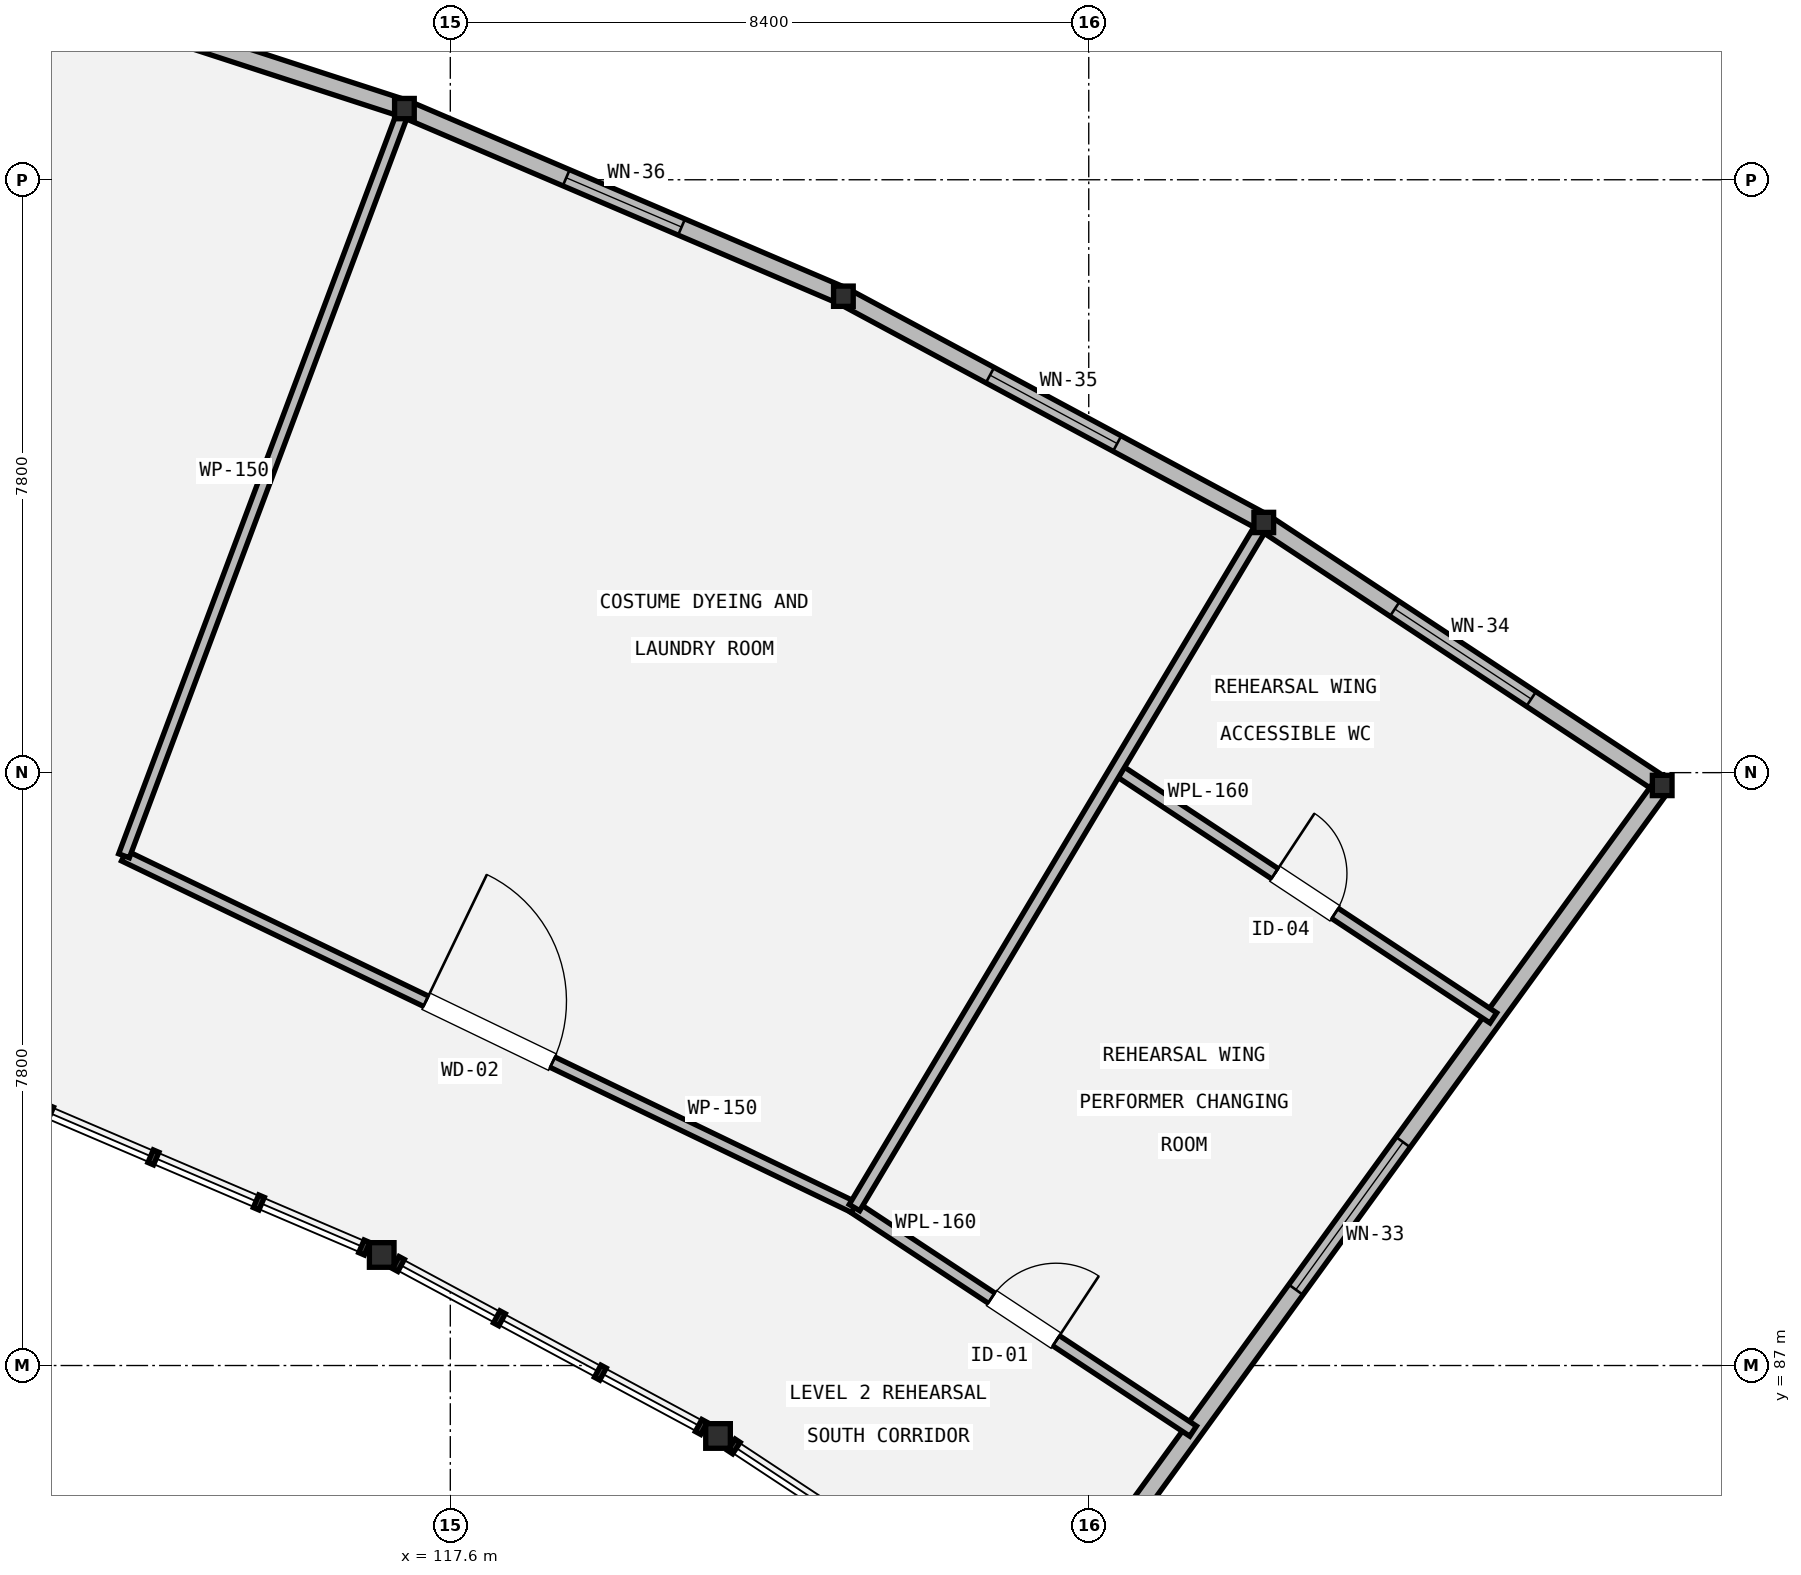
"""IFC4 building model, lengths in metres.
Left out: names, types, materials, properties, quantities, classifications, styles, units other than length and angle.
Written with IfcOpenShell. Run it as: python <this file> out.ifc"""

import sys

from ifc_helpers import new_model, si_unit, direction, frame, frame_2d, origin, origin_2d, place, context, subcontext, project, spatial, rectangle, hollow_circle, i_section, extrude, element, fill, save


model = new_model("IFC4")
c1 = context("Model", 3, precision=1e-05, world=origin(), true_north=direction((0.0, 1.0)))
c2 = subcontext(c1, "Body", "Model", "MODEL_VIEW")
j1 = project(units=[si_unit("LENGTHUNIT", "METRE"), si_unit("PLANEANGLEUNIT", "RADIAN")], contexts=[c1])
p1 = place(None, origin())
s1 = spatial("IfcSite", under=j1, at=p1, CompositionType="ELEMENT")
p2 = place(p1, origin())
s2 = spatial("IfcBuilding", under=s1, at=p2, CompositionType="ELEMENT")
p3 = place(p2, frame((0.0, 0.0, 10.2)))
s3 = spatial("IfcBuildingStorey", under=s2, at=p3, CompositionType="ELEMENT", Elevation=10.2)
p4 = place(p3, frame((116.996, 103.536, 0.0), z_axis=(0.0, 0.0, 1.0), x_axis=(1.0, 0.0, 0.0)))
e1 = element("IfcColumn", 1, at=p4, inside=s3, PredefinedType="COLUMN", context=c2, shape_type="SweptSolid", body=[
    extrude(i_section(OverallWidth=0.259, OverallDepth=0.267, WebThickness=0.013, FlangeThickness=0.021, FilletRadius=0.013, at=origin_2d()), origin(), (0.0, 0.0, 1.0), 4.8),
])
p5 = place(p3, frame((116.698, 88.454, 0.0), z_axis=(0.0, 0.0, 1.0), x_axis=(1.0, 0.0, 0.0)))
e2 = element("IfcColumn", 2, at=p5, inside=s3, PredefinedType="COLUMN", context=c2, shape_type="SweptSolid", body=[
    extrude(hollow_circle(Radius=0.162, WallThickness=0.012, at=origin_2d()), origin(), (0.0, 0.0, 1.0), 4.8),
])
p6 = place(p3, frame((122.772, 101.068, 0.0), z_axis=(0.0, 0.0, 1.0), x_axis=(1.0, 0.0, 0.0)))
e3 = element("IfcColumn", 3, at=p6, inside=s3, PredefinedType="COLUMN", context=c2, shape_type="SweptSolid", body=[
    extrude(i_section(OverallWidth=0.259, OverallDepth=0.267, WebThickness=0.013, FlangeThickness=0.021, FilletRadius=0.013, at=origin_2d()), origin(), (0.0, 0.0, 1.0), 4.8),
])
p7 = place(p3, frame((121.122, 86.073, 0.0), z_axis=(0.0, 0.0, 1.0), x_axis=(1.0, 0.0, 0.0)))
e4 = element("IfcColumn", 4, at=p7, inside=s3, PredefinedType="COLUMN", context=c2, shape_type="SweptSolid", body=[
    extrude(hollow_circle(Radius=0.162, WallThickness=0.012, at=origin_2d()), origin(), (0.0, 0.0, 1.0), 4.8),
])
for number, where, z_axis, x_axis in (
    (5, (128.303, 98.091, 0.0), (0.0, 0.0, 1.0), (1.0, 0.0, 0.0)),
    (6, (133.545, 94.631, 0.0), (0.0, 0.0, 1.0), (1.0, 0.0, 0.0)),
):
    element("IfcColumn", number, at=place(p3, frame(where, z_axis=z_axis, x_axis=x_axis)), inside=s3, PredefinedType="COLUMN", context=c2, shape_type="SweptSolid", body=[
        extrude(i_section(OverallWidth=0.259, OverallDepth=0.267, WebThickness=0.013, FlangeThickness=0.021, FilletRadius=0.013, at=origin_2d()), origin(), (0.0, 0.0, 1.0), 4.8),
    ])
p8 = place(p3, frame((111.023, 105.477, 0.0), z_axis=(0.0, 0.0, 1.0), x_axis=(0.951054348109, -0.309023667285, 0.0)))
e7 = element("IfcWall", 7, at=p8, inside=s3, PredefinedType="STANDARD", context=c2, shape_type="SweptSolid", body=[
    extrude(rectangle(XDim=6.281, YDim=0.23, at=frame_2d((3.14, 0.0))), origin(), (0.0, 0.0, 1.0), 4.059),
])
p9 = place(p3, frame((116.996, 103.536, 0.0), z_axis=(0.0, 0.0, 1.0), x_axis=(0.919540617607, -0.392994977793, 0.0)))
e8 = element("IfcWall", 8, at=p9, inside=s3, PredefinedType="STANDARD", context=c2, shape_type="SweptSolid", body=[
    extrude(rectangle(XDim=6.281, YDim=0.23, at=frame_2d((3.141, 0.0))), origin(), (0.0, 0.0, 1.0), 4.059),
])
p10 = place(p9, frame((2.316, 0.0, 0.9)))
e9 = element("IfcOpeningElement", 9, at=p10, cuts=e8, PredefinedType="OPENING", context=c2, shape_type="SweptSolid", body=[
    extrude(rectangle(XDim=1.65, YDim=1.65, at=frame_2d((0.825, 0.825))), frame((0.0, 0.125, 0.0), z_axis=(0.0, -1.0, 0.0), x_axis=(1.0, 0.0, 0.0)), (0.0, 0.0, 1.0), 0.25),
])
p11 = place(p3, frame((122.772, 101.068, 0.0), z_axis=(0.0, 0.0, 1.0), x_axis=(0.880582156138, -0.473893517883, 0.0)))
e10 = element("IfcWall", 10, at=p11, inside=s3, PredefinedType="STANDARD", context=c2, shape_type="SweptSolid", body=[
    extrude(rectangle(XDim=6.281, YDim=0.23, at=frame_2d((3.141, 0.0))), origin(), (0.0, 0.0, 1.0), 4.059),
])
p12 = place(p11, frame((2.19, 0.0, 0.9)))
e11 = element("IfcOpeningElement", 11, at=p12, cuts=e10, PredefinedType="OPENING", context=c2, shape_type="SweptSolid", body=[
    extrude(rectangle(XDim=1.9, YDim=1.65, at=frame_2d((0.95, 0.825))), frame((0.0, 0.125, 0.0), z_axis=(0.0, -1.0, 0.0), x_axis=(1.0, 0.0, 0.0)), (0.0, 0.0, 1.0), 0.25),
])
p13 = place(p3, frame((128.303, 98.091, 0.0), z_axis=(0.0, 0.0, 1.0), x_axis=(0.834571163011, -0.550900148729, 0.0)))
e12 = element("IfcWall", 12, at=p13, inside=s3, PredefinedType="STANDARD", context=c2, shape_type="SweptSolid", body=[
    extrude(rectangle(XDim=6.281, YDim=0.23, at=frame_2d((3.141, 0.0))), origin(), (0.0, 0.0, 1.0), 4.059),
])
p14 = place(p13, frame((2.066, 0.0, 0.9)))
e13 = element("IfcOpeningElement", 13, at=p14, cuts=e12, PredefinedType="OPENING", context=c2, shape_type="SweptSolid", body=[
    extrude(rectangle(XDim=2.15, YDim=1.65, at=frame_2d((1.075, 0.825))), frame((0.0, 0.125, 0.0), z_axis=(0.0, -1.0, 0.0), x_axis=(1.0, 0.0, 0.0)), (0.0, 0.0, 1.0), 0.25),
])
p15 = place(p3, frame((133.545, 94.631, 0.0), z_axis=(0.0, 0.0, 1.0), x_axis=(-0.587787980643, -0.809015012105, 0.0)))
e14 = element("IfcWall", 14, at=p15, inside=s3, PredefinedType="STANDARD", context=c2, shape_type="SweptSolid", body=[
    extrude(rectangle(XDim=14.0, YDim=0.23, at=frame_2d((7.0, 0.0))), origin(), (0.0, 0.0, 1.0), 4.059),
])
p16 = place(p15, frame((5.8, 0.0, 0.9)))
e15 = element("IfcOpeningElement", 15, at=p16, cuts=e14, PredefinedType="OPENING", context=c2, shape_type="SweptSolid", body=[
    extrude(rectangle(XDim=2.4, YDim=1.65, at=frame_2d((1.2, 0.825))), frame((0.0, 0.125, 0.0), z_axis=(0.0, -1.0, 0.0), x_axis=(1.0, 0.0, 0.0)), (0.0, 0.0, 1.0), 0.25),
])
p17 = place(p3, frame((113.307, 93.706, 0.0), z_axis=(0.0, 0.0, 1.0), x_axis=(0.900961574772, -0.433898883133, 0.0)))
e16 = element("IfcWall", 16, at=p17, inside=s3, PredefinedType="PARTITIONING", context=c2, shape_type="SweptSolid", body=[
    extrude(rectangle(XDim=10.667, YDim=0.15, at=frame_2d((5.333, 0.0))), origin(), (0.0, 0.0, 1.0), 4.059),
])
p18 = place(p17, frame((4.408, 0.0, 0.0)))
e17 = element("IfcOpeningElement", 17, at=p18, cuts=e16, PredefinedType="OPENING", context=c2, shape_type="SweptSolid", body=[
    extrude(rectangle(XDim=1.85, YDim=2.4, at=frame_2d((0.925, 1.2))), frame((0.0, 0.085, 0.0), z_axis=(0.0, -1.0, 0.0), x_axis=(1.0, 0.0, 0.0)), (0.0, 0.0, 1.0), 0.17),
])
p19 = place(p3, frame((122.917, 89.078, 0.0), z_axis=(0.0, 0.0, 1.0), x_axis=(0.834581234797, -0.550884890449, 0.0)))
e18 = element("IfcWall", 18, at=p19, inside=s3, PredefinedType="PLUMBINGWALL", context=c2, shape_type="SweptSolid", body=[
    extrude(rectangle(XDim=5.339, YDim=0.16, at=frame_2d((2.669, 0.0))), origin(), (0.0, 0.0, 1.0), 4.059),
])
p20 = place(p19, frame((2.159, 0.0, 0.0)))
e19 = element("IfcOpeningElement", 19, at=p20, cuts=e18, PredefinedType="OPENING", context=c2, shape_type="SweptSolid", body=[
    extrude(rectangle(XDim=1.02, YDim=2.1, at=frame_2d((0.51, 1.05))), frame((0.0, 0.09, 0.0), z_axis=(0.0, -1.0, 0.0), x_axis=(1.0, 0.0, 0.0)), (0.0, 0.0, 1.0), 0.18),
])
p21 = place(p3, frame((126.364, 94.846, 0.0), z_axis=(0.0, 0.0, 1.0), x_axis=(0.834570114264, -0.550901737497, 0.0)))
e20 = element("IfcWall", 20, at=p21, inside=s3, PredefinedType="PLUMBINGWALL", context=c2, shape_type="SweptSolid", body=[
    extrude(rectangle(XDim=5.942, YDim=0.16, at=frame_2d((2.971, 0.0))), origin(), (0.0, 0.0, 1.0), 4.059),
])
p22 = place(p21, frame((2.496, 0.0, 0.0)))
e21 = element("IfcOpeningElement", 21, at=p22, cuts=e20, PredefinedType="OPENING", context=c2, shape_type="SweptSolid", body=[
    extrude(rectangle(XDim=0.95, YDim=2.1, at=frame_2d((0.475, 1.05))), frame((0.0, 0.09, 0.0), z_axis=(0.0, -1.0, 0.0), x_axis=(1.0, 0.0, 0.0)), (0.0, 0.0, 1.0), 0.18),
])
p23 = place(p3, frame((113.307, 93.706, 0.0), z_axis=(0.0, 0.0, 1.0), x_axis=(0.351360409251, 0.93624028049, 0.0)))
e22 = element("IfcWall", 22, at=p23, inside=s3, PredefinedType="PARTITIONING", context=c2, shape_type="SweptSolid", body=[
    extrude(rectangle(XDim=10.5, YDim=0.15, at=frame_2d((5.25, 0.0))), origin(), (0.0, 0.0, 1.0), 4.059),
])
p24 = place(p3, frame((122.917, 89.078, 0.0), z_axis=(0.0, 0.0, 1.0), x_axis=(0.512904878558, 0.858445447045, 0.0)))
e23 = element("IfcWall", 23, at=p24, inside=s3, PredefinedType="PLUMBINGWALL", context=c2, shape_type="SweptSolid", body=[
    extrude(rectangle(XDim=10.5, YDim=0.16, at=frame_2d((5.25, 0.0))), origin(), (0.0, 0.0, 1.0), 4.059),
])
p25 = place(p10, origin())
e24 = element("IfcWindow", 24, at=p25, inside=s3, PartitioningType="SINGLE_PANEL", PredefinedType="WINDOW", context=c2, shape_type="SweptSolid", body=[
    extrude(rectangle(XDim=1.65, YDim=1.65, at=frame_2d((0.825, 0.825))), frame((0.0, 0.03, 0.0), z_axis=(0.0, -1.0, 0.0), x_axis=(1.0, 0.0, 0.0)), (0.0, 0.0, 1.0), 0.06),
])
fill(e9, e24)
p26 = place(p12, origin())
e25 = element("IfcWindow", 25, at=p26, inside=s3, PartitioningType="SINGLE_PANEL", PredefinedType="WINDOW", context=c2, shape_type="SweptSolid", body=[
    extrude(rectangle(XDim=1.9, YDim=1.65, at=frame_2d((0.95, 0.825))), frame((0.0, 0.03, 0.0), z_axis=(0.0, -1.0, 0.0), x_axis=(1.0, 0.0, 0.0)), (0.0, 0.0, 1.0), 0.06),
])
fill(e11, e25)
p27 = place(p14, origin())
e26 = element("IfcWindow", 26, at=p27, inside=s3, PartitioningType="SINGLE_PANEL", PredefinedType="WINDOW", context=c2, shape_type="SweptSolid", body=[
    extrude(rectangle(XDim=2.15, YDim=1.65, at=frame_2d((1.075, 0.825))), frame((0.0, 0.03, 0.0), z_axis=(0.0, -1.0, 0.0), x_axis=(1.0, 0.0, 0.0)), (0.0, 0.0, 1.0), 0.06),
])
fill(e13, e26)
p28 = place(p16, origin())
e27 = element("IfcWindow", 27, at=p28, inside=s3, PartitioningType="SINGLE_PANEL", PredefinedType="WINDOW", context=c2, shape_type="SweptSolid", body=[
    extrude(rectangle(XDim=2.4, YDim=1.65, at=frame_2d((1.2, 0.825))), frame((0.0, 0.03, 0.0), z_axis=(0.0, -1.0, 0.0), x_axis=(1.0, 0.0, 0.0)), (0.0, 0.0, 1.0), 0.06),
])
fill(e15, e27)
p29 = place(p18, origin())
e28 = element("IfcDoor", 28, at=p29, inside=s3, OperationType="SINGLE_SWING_LEFT", PredefinedType="DOOR", context=c2, shape_type="SweptSolid", body=[
    extrude(rectangle(XDim=1.85, YDim=2.4, at=frame_2d((0.925, 1.2))), frame((0.0, 0.025, 0.0), z_axis=(0.0, -1.0, 0.0), x_axis=(1.0, 0.0, 0.0)), (0.0, 0.0, 1.0), 0.05),
])
fill(e17, e28)
p30 = place(p20, origin())
e29 = element("IfcDoor", 29, at=p30, inside=s3, OperationType="SINGLE_SWING_RIGHT", PredefinedType="DOOR", context=c2, shape_type="SweptSolid", body=[
    extrude(rectangle(XDim=1.02, YDim=2.1, at=frame_2d((0.51, 1.05))), frame((0.0, 0.025, 0.0), z_axis=(0.0, -1.0, 0.0), x_axis=(1.0, 0.0, 0.0)), (0.0, 0.0, 1.0), 0.05),
])
fill(e19, e29)
p31 = place(p22, origin())
e30 = element("IfcDoor", 30, at=p31, inside=s3, OperationType="SINGLE_SWING_LEFT", PredefinedType="DOOR", context=c2, shape_type="SweptSolid", body=[
    extrude(rectangle(XDim=0.95, YDim=2.1, at=frame_2d((0.475, 1.05))), frame((0.0, 0.025, 0.0), z_axis=(0.0, -1.0, 0.0), x_axis=(1.0, 0.0, 0.0)), (0.0, 0.0, 1.0), 0.05),
])
fill(e21, e30)
save(model, sys.argv[1])
